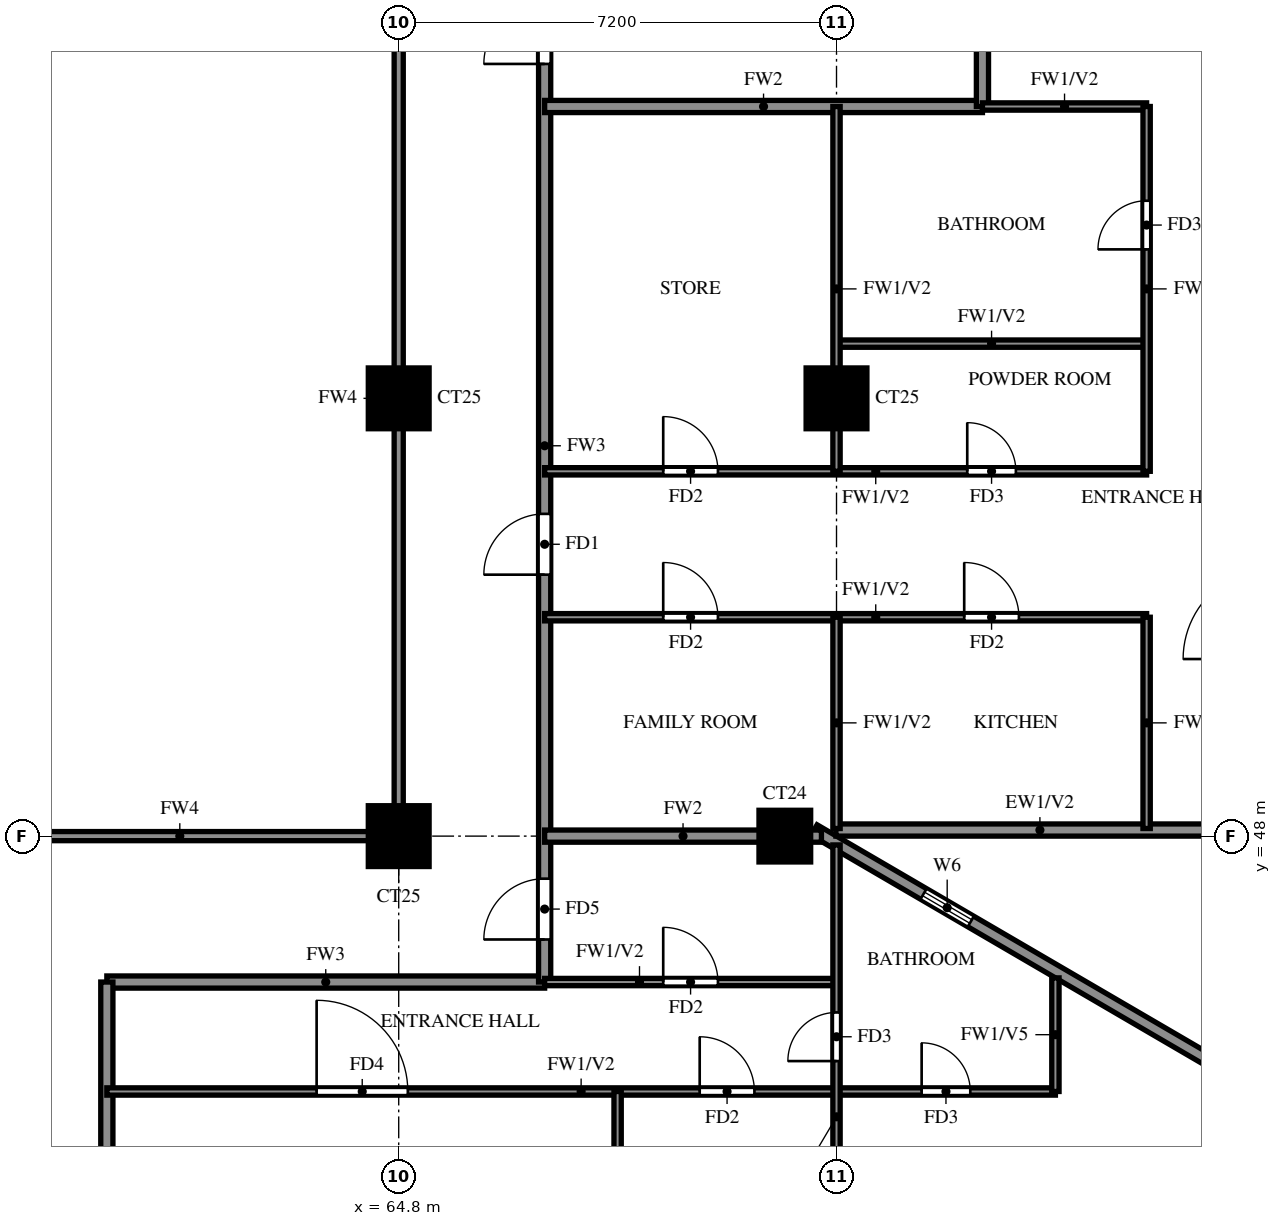
"""IFC4 building model, lengths in metres.
Left out: names, types, materials, properties, quantities, classifications, styles, units other than length and angle.
Written with IfcOpenShell. Run it as: python <this file> out.ifc"""

import sys

from ifc_helpers import new_model, si_unit, direction, frame, frame_2d, origin, origin_2d, place, context, subcontext, project, spatial, rectangle, extrude, source, transform, mapped, element, fill, save


model = new_model("IFC4")
c1 = context("Model", 3, precision=1e-05, world=origin(), true_north=direction((0.0, 1.0)))
c2 = subcontext(c1, "Body", "Model", "MODEL_VIEW")
j1 = project(units=[si_unit("LENGTHUNIT", "METRE"), si_unit("PLANEANGLEUNIT", "RADIAN")], contexts=[c1])
p1 = place(None, origin())
s1 = spatial("IfcSite", under=j1, at=p1, CompositionType="ELEMENT")
p2 = place(p1, origin())
s2 = spatial("IfcBuilding", under=s1, at=p2, CompositionType="ELEMENT")
p3 = place(p2, frame((0.0, 0.0, 164.0)))
s3 = spatial("IfcBuildingStorey", under=s2, at=p3, CompositionType="ELEMENT", Elevation=164.0)
m1 = source(origin(), c2, "Body", "SweptSolid", [
    extrude(rectangle(XDim=1.0, YDim=1.0, at=origin_2d()), origin(), (0.0, 0.0, 1.0), 3.2),
])
p4 = place(p3, frame((64.8, 48.0, 0.0), z_axis=(0.0, 0.0, 1.0), x_axis=(1.0, 0.0, 0.0)))
e1 = element("IfcColumn", 1, at=p4, inside=s3, PredefinedType="COLUMN", context=c2, shape_type="MappedRepresentation", body=[
    mapped(m1, transform((0.0, 0.0, 0.0))),
])
m2 = source(origin(), c2, "Body", "SweptSolid", [
    extrude(rectangle(XDim=0.85, YDim=0.85, at=origin_2d()), origin(), (0.0, 0.0, 1.0), 3.2),
])
p5 = place(p3, frame((71.15, 48.0, 0.0), z_axis=(0.0, 0.0, 1.0), x_axis=(1.0, 0.0, 0.0)))
e2 = element("IfcColumn", 2, at=p5, inside=s3, PredefinedType="COLUMN", context=c2, shape_type="MappedRepresentation", body=[
    mapped(m2, transform((0.0, 0.0, 0.0))),
])
for number, where, z_axis, x_axis in (
    (3, (64.8, 55.2, 0.0), (0.0, 0.0, 1.0), (1.0, 0.0, 0.0)),
    (4, (72.0, 55.2, 0.0), (0.0, 0.0, 1.0), (1.0, 0.0, 0.0)),
):
    element("IfcColumn", number, at=place(p3, frame(where, z_axis=z_axis, x_axis=x_axis)), inside=s3, PredefinedType="COLUMN", context=c2, shape_type="MappedRepresentation", body=[
        mapped(m1, transform((0.0, 0.0, 0.0))),
    ])
p6 = place(p3, frame((85.719, 39.881, 0.0), z_axis=(0.0, 0.0, 1.0), x_axis=(-0.86377618652, 0.503875678716, 0.0)))
e5 = element("IfcWall", 5, at=p6, inside=s3, PredefinedType="SOLIDWALL", context=c2, shape_type="SweptSolid", body=[
    extrude(rectangle(XDim=16.311, YDim=0.2, at=frame_2d((8.156, 0.0))), origin(), (0.0, 0.0, 1.0), 3.2),
])
p7 = place(p6, frame((13.326, 0.0, 1.5)))
e6 = element("IfcOpeningElement", 6, at=p7, cuts=e5, PredefinedType="OPENING", context=c2, shape_type="SweptSolid", body=[
    extrude(rectangle(XDim=0.9, YDim=0.9, at=frame_2d((0.45, 0.45))), frame((0.0, 0.11, 0.0), z_axis=(0.0, -1.0, 0.0), x_axis=(1.0, 0.0, 0.0)), (0.0, 0.0, 1.0), 0.22),
])
p8 = place(p3, frame((71.99, 48.1, 0.0), z_axis=(0.0, 0.0, 1.0), x_axis=(1.0, 0.0, 0.0)))
e7 = element("IfcWall", 7, at=p8, inside=s3, PredefinedType="SOLIDWALL", context=c2, shape_type="SweptSolid", body=[
    extrude(rectangle(XDim=6.71, YDim=0.2, at=frame_2d((3.355, 0.0))), origin(), (0.0, 0.0, 1.0), 3.2),
])
p9 = place(p3, frame((60.0, 45.6, 0.0), z_axis=(0.0, 0.0, 1.0), x_axis=(1.0, 0.0, 0.0)))
e8 = element("IfcWall", 8, at=p9, inside=s3, PredefinedType="SOLIDWALL", context=c2, shape_type="SweptSolid", body=[
    extrude(rectangle(XDim=7.2, YDim=0.2, at=frame_2d((3.6, 0.0))), origin(), (0.0, 0.0, 1.0), 3.2),
])
p10 = place(p3, frame((60.0, 39.725, 0.0), z_axis=(0.0, 0.0, 1.0), x_axis=(0.0, 1.0, 0.0)))
e9 = element("IfcWall", 9, at=p10, inside=s3, PredefinedType="SOLIDWALL", context=c2, shape_type="SweptSolid", body=[
    extrude(rectangle(XDim=5.875, YDim=0.2, at=frame_2d((2.938, 0.0))), origin(), (0.0, 0.0, 1.0), 3.2),
])
p11 = place(p3, frame((67.2, 45.6, 0.0), z_axis=(0.0, 0.0, 1.0), x_axis=(0.0, 1.0, 0.0)))
e10 = element("IfcWall", 10, at=p11, inside=s3, PredefinedType="SOLIDWALL", context=c2, shape_type="SweptSolid", body=[
    extrude(rectangle(XDim=16.8, YDim=0.2, at=frame_2d((8.4, 0.0))), origin(), (0.0, 0.0, 1.0), 3.2),
])
p12 = place(p11, frame((6.7, 0.0, 0.0)))
e11 = element("IfcOpeningElement", 11, at=p12, cuts=e10, PredefinedType="OPENING", context=c2, shape_type="SweptSolid", body=[
    extrude(rectangle(XDim=1.0, YDim=2.1, at=frame_2d((0.5, 1.05))), frame((0.0, 0.11, 0.0), z_axis=(0.0, -1.0, 0.0), x_axis=(1.0, 0.0, 0.0)), (0.0, 0.0, 1.0), 0.22),
])
p13 = place(p11, frame((15.1, 0.0, 0.0)))
e12 = element("IfcOpeningElement", 12, at=p13, cuts=e10, PredefinedType="OPENING", context=c2, shape_type="SweptSolid", body=[
    extrude(rectangle(XDim=1.0, YDim=2.1, at=frame_2d((0.5, 1.05))), frame((0.0, 0.11, 0.0), z_axis=(0.0, -1.0, 0.0), x_axis=(1.0, 0.0, 0.0)), (0.0, 0.0, 1.0), 0.22),
])
p14 = place(p11, frame((0.7, 0.0, 0.0)))
e13 = element("IfcOpeningElement", 13, at=p14, cuts=e10, PredefinedType="OPENING", context=c2, shape_type="SweptSolid", body=[
    extrude(rectangle(XDim=1.0, YDim=2.1, at=frame_2d((0.5, 1.05))), frame((0.0, 0.11, 0.0), z_axis=(0.0, -1.0, 0.0), x_axis=(1.0, 0.0, 0.0)), (0.0, 0.0, 1.0), 0.22),
])
p15 = place(p3, frame((67.2, 48.0, 0.0), z_axis=(0.0, 0.0, 1.0), x_axis=(1.0, 0.0, 0.0)))
e14 = element("IfcWall", 14, at=p15, inside=s3, PredefinedType="SOLIDWALL", context=c2, shape_type="SweptSolid", body=[
    extrude(rectangle(XDim=4.552, YDim=0.2, at=frame_2d((2.276, 0.0))), origin(), (0.0, 0.0, 1.0), 3.2),
])
p16 = place(p3, frame((67.2, 60.0, 0.0), z_axis=(0.0, 0.0, 1.0), x_axis=(1.0, 0.0, 0.0)))
e15 = element("IfcWall", 15, at=p16, inside=s3, PredefinedType="SOLIDWALL", context=c2, shape_type="SweptSolid", body=[
    extrude(rectangle(XDim=7.2, YDim=0.2, at=frame_2d((3.6, 0.0))), origin(), (0.0, 0.0, 1.0), 3.2),
])
p17 = place(p3, frame((74.4, 60.0, 0.0), z_axis=(0.0, 0.0, 1.0), x_axis=(0.0, 1.0, 0.0)))
e16 = element("IfcWall", 16, at=p17, inside=s3, PredefinedType="SOLIDWALL", context=c2, shape_type="SweptSolid", body=[
    extrude(rectangle(XDim=2.4, YDim=0.2, at=frame_2d((1.2, 0.0))), origin(), (0.0, 0.0, 1.0), 3.2),
])
p18 = place(p3, frame((60.0, 43.8, 0.0), z_axis=(0.0, 0.0, 1.0), x_axis=(1.0, 0.0, 0.0)))
e17 = element("IfcWall", 17, at=p18, inside=s3, PredefinedType="PARTITIONING", context=c2, shape_type="SweptSolid", body=[
    extrude(rectangle(XDim=15.6, YDim=0.12, at=frame_2d((7.8, 0.0))), origin(), (0.0, 0.0, 1.0), 3.2),
])
p19 = place(p18, frame((9.75, 0.0, 0.0)))
e18 = element("IfcOpeningElement", 18, at=p19, cuts=e17, PredefinedType="OPENING", context=c2, shape_type="SweptSolid", body=[
    extrude(rectangle(XDim=0.9, YDim=2.1, at=frame_2d((0.45, 1.05))), frame((0.0, 0.07, 0.0), z_axis=(0.0, -1.0, 0.0), x_axis=(1.0, 0.0, 0.0)), (0.0, 0.0, 1.0), 0.14),
])
p20 = place(p18, frame((3.45, 0.0, 0.0)))
e19 = element("IfcOpeningElement", 19, at=p20, cuts=e17, PredefinedType="OPENING", context=c2, shape_type="SweptSolid", body=[
    extrude(rectangle(XDim=1.5, YDim=2.1, at=frame_2d((0.75, 1.05))), frame((0.0, 0.07, 0.0), z_axis=(0.0, -1.0, 0.0), x_axis=(1.0, 0.0, 0.0)), (0.0, 0.0, 1.0), 0.14),
])
p21 = place(p18, frame((13.4, 0.0, 0.0)))
e20 = element("IfcOpeningElement", 20, at=p21, cuts=e17, PredefinedType="OPENING", context=c2, shape_type="SweptSolid", body=[
    extrude(rectangle(XDim=0.8, YDim=2.1, at=frame_2d((0.4, 1.05))), frame((0.0, 0.07, 0.0), z_axis=(0.0, -1.0, 0.0), x_axis=(1.0, 0.0, 0.0)), (0.0, 0.0, 1.0), 0.14),
])
p22 = place(p3, frame((67.2, 45.6, 0.0), z_axis=(0.0, 0.0, 1.0), x_axis=(1.0, 0.0, 0.0)))
e21 = element("IfcWall", 21, at=p22, inside=s3, PredefinedType="PARTITIONING", context=c2, shape_type="SweptSolid", body=[
    extrude(rectangle(XDim=4.8, YDim=0.12, at=frame_2d((2.4, 0.0))), origin(), (0.0, 0.0, 1.0), 3.2),
])
p23 = place(p22, frame((1.95, 0.0, 0.0)))
e22 = element("IfcOpeningElement", 22, at=p23, cuts=e21, PredefinedType="OPENING", context=c2, shape_type="SweptSolid", body=[
    extrude(rectangle(XDim=0.9, YDim=2.1, at=frame_2d((0.45, 1.05))), frame((0.0, 0.07, 0.0), z_axis=(0.0, -1.0, 0.0), x_axis=(1.0, 0.0, 0.0)), (0.0, 0.0, 1.0), 0.14),
])
p24 = place(p3, frame((67.2, 51.6, 0.0), z_axis=(0.0, 0.0, 1.0), x_axis=(1.0, 0.0, 0.0)))
e23 = element("IfcWall", 23, at=p24, inside=s3, PredefinedType="PARTITIONING", context=c2, shape_type="SweptSolid", body=[
    extrude(rectangle(XDim=9.9, YDim=0.12, at=frame_2d((4.95, 0.0))), origin(), (0.0, 0.0, 1.0), 3.2),
])
p25 = place(p24, frame((6.9, 0.0, 0.0)))
e24 = element("IfcOpeningElement", 24, at=p25, cuts=e23, PredefinedType="OPENING", context=c2, shape_type="SweptSolid", body=[
    extrude(rectangle(XDim=0.9, YDim=2.1, at=frame_2d((0.45, 1.05))), frame((0.0, 0.07, 0.0), z_axis=(0.0, -1.0, 0.0), x_axis=(1.0, 0.0, 0.0)), (0.0, 0.0, 1.0), 0.14),
])
p26 = place(p24, frame((1.95, 0.0, 0.0)))
e25 = element("IfcOpeningElement", 25, at=p26, cuts=e23, PredefinedType="OPENING", context=c2, shape_type="SweptSolid", body=[
    extrude(rectangle(XDim=0.9, YDim=2.1, at=frame_2d((0.45, 1.05))), frame((0.0, 0.07, 0.0), z_axis=(0.0, -1.0, 0.0), x_axis=(1.0, 0.0, 0.0)), (0.0, 0.0, 1.0), 0.14),
])
p27 = place(p3, frame((67.2, 54.0, 0.0), z_axis=(0.0, 0.0, 1.0), x_axis=(1.0, 0.0, 0.0)))
e26 = element("IfcWall", 26, at=p27, inside=s3, PredefinedType="PARTITIONING", context=c2, shape_type="SweptSolid", body=[
    extrude(rectangle(XDim=9.9, YDim=0.12, at=frame_2d((4.95, 0.0))), origin(), (0.0, 0.0, 1.0), 3.2),
])
p28 = place(p27, frame((6.95, 0.0, 0.0)))
e27 = element("IfcOpeningElement", 27, at=p28, cuts=e26, PredefinedType="OPENING", context=c2, shape_type="SweptSolid", body=[
    extrude(rectangle(XDim=0.8, YDim=2.1, at=frame_2d((0.4, 1.05))), frame((0.0, 0.07, 0.0), z_axis=(0.0, -1.0, 0.0), x_axis=(1.0, 0.0, 0.0)), (0.0, 0.0, 1.0), 0.14),
])
p29 = place(p27, frame((1.95, 0.0, 0.0)))
e28 = element("IfcOpeningElement", 28, at=p29, cuts=e26, PredefinedType="OPENING", context=c2, shape_type="SweptSolid", body=[
    extrude(rectangle(XDim=0.9, YDim=2.1, at=frame_2d((0.45, 1.05))), frame((0.0, 0.07, 0.0), z_axis=(0.0, -1.0, 0.0), x_axis=(1.0, 0.0, 0.0)), (0.0, 0.0, 1.0), 0.14),
])
p30 = place(p3, frame((72.0, 56.1, 0.0), z_axis=(0.0, 0.0, 1.0), x_axis=(1.0, 0.0, 0.0)))
e29 = element("IfcWall", 29, at=p30, inside=s3, PredefinedType="PARTITIONING", context=c2, shape_type="SweptSolid", body=[
    extrude(rectangle(XDim=5.1, YDim=0.12, at=frame_2d((2.55, 0.0))), origin(), (0.0, 0.0, 1.0), 3.2),
])
p31 = place(p3, frame((74.4, 60.0, 0.0), z_axis=(0.0, 0.0, 1.0), x_axis=(1.0, 0.0, 0.0)))
e30 = element("IfcWall", 30, at=p31, inside=s3, PredefinedType="PARTITIONING", context=c2, shape_type="SweptSolid", body=[
    extrude(rectangle(XDim=2.7, YDim=0.12, at=frame_2d((1.35, 0.0))), origin(), (0.0, 0.0, 1.0), 3.2),
])
p32 = place(p3, frame((68.4, 39.725, 0.0), z_axis=(0.0, 0.0, 1.0), x_axis=(0.0, 1.0, 0.0)))
e31 = element("IfcWall", 31, at=p32, inside=s3, PredefinedType="PARTITIONING", context=c2, shape_type="SweptSolid", body=[
    extrude(rectangle(XDim=4.075, YDim=0.12, at=frame_2d((2.038, 0.0))), origin(), (0.0, 0.0, 1.0), 3.2),
])
p33 = place(p32, frame((1.288, 0.0, 0.0)))
e32 = element("IfcOpeningElement", 32, at=p33, cuts=e31, PredefinedType="OPENING", context=c2, shape_type="SweptSolid", body=[
    extrude(rectangle(XDim=1.5, YDim=2.1, at=frame_2d((0.75, 1.05))), frame((0.0, 0.07, 0.0), z_axis=(0.0, -1.0, 0.0), x_axis=(1.0, 0.0, 0.0)), (0.0, 0.0, 1.0), 0.14),
])
p34 = place(p3, frame((72.0, 39.725, 0.0), z_axis=(0.0, 0.0, 1.0), x_axis=(0.0, 1.0, 0.0)))
e33 = element("IfcWall", 33, at=p34, inside=s3, PredefinedType="PARTITIONING", context=c2, shape_type="SweptSolid", body=[
    extrude(rectangle(XDim=8.13, YDim=0.12, at=frame_2d((4.065, 0.0))), origin(), (0.0, 0.0, 1.0), 2.3),
])
p35 = place(p34, frame((1.788, 0.0, 0.0)))
e34 = element("IfcOpeningElement", 34, at=p35, cuts=e33, PredefinedType="OPENING", context=c2, shape_type="SweptSolid", body=[
    extrude(rectangle(XDim=0.9, YDim=2.1, at=frame_2d((0.45, 1.05))), frame((0.0, 0.07, 0.0), z_axis=(0.0, -1.0, 0.0), x_axis=(1.0, 0.0, 0.0)), (0.0, 0.0, 1.0), 0.14),
])
p36 = place(p34, frame((4.575, 0.0, 0.0)))
e35 = element("IfcOpeningElement", 35, at=p36, cuts=e33, PredefinedType="OPENING", context=c2, shape_type="SweptSolid", body=[
    extrude(rectangle(XDim=0.8, YDim=2.1, at=frame_2d((0.4, 1.05))), frame((0.0, 0.07, 0.0), z_axis=(0.0, -1.0, 0.0), x_axis=(1.0, 0.0, 0.0)), (0.0, 0.0, 1.0), 0.14),
])
p37 = place(p3, frame((72.0, 48.125, 0.0), z_axis=(0.0, 0.0, 1.0), x_axis=(0.0, 1.0, 0.0)))
e36 = element("IfcWall", 36, at=p37, inside=s3, PredefinedType="PARTITIONING", context=c2, shape_type="SweptSolid", body=[
    extrude(rectangle(XDim=3.475, YDim=0.12, at=frame_2d((1.738, 0.0))), origin(), (0.0, 0.0, 1.0), 3.2),
])
p38 = place(p3, frame((72.0, 54.0, 0.0), z_axis=(0.0, 0.0, 1.0), x_axis=(0.0, 1.0, 0.0)))
e37 = element("IfcWall", 37, at=p38, inside=s3, PredefinedType="PARTITIONING", context=c2, shape_type="SweptSolid", body=[
    extrude(rectangle(XDim=6.0, YDim=0.12, at=frame_2d((3.0, 0.0))), origin(), (0.0, 0.0, 1.0), 3.2),
])
p39 = place(p3, frame((75.6, 43.8, 0.0), z_axis=(0.0, 0.0, 1.0), x_axis=(0.0, 1.0, 0.0)))
e38 = element("IfcWall", 38, at=p39, inside=s3, PredefinedType="PARTITIONING", context=c2, shape_type="SweptSolid", body=[
    extrude(rectangle(XDim=1.868, YDim=0.12, at=frame_2d((0.934, 0.0))), origin(), (0.0, 0.0, 1.0), 2.3),
])
p40 = place(p3, frame((77.1, 48.125, 0.0), z_axis=(0.0, 0.0, 1.0), x_axis=(0.0, 1.0, 0.0)))
e39 = element("IfcWall", 39, at=p40, inside=s3, PredefinedType="PARTITIONING", context=c2, shape_type="SweptSolid", body=[
    extrude(rectangle(XDim=3.475, YDim=0.12, at=frame_2d((1.738, 0.0))), origin(), (0.0, 0.0, 1.0), 3.2),
])
p41 = place(p3, frame((77.1, 54.0, 0.0), z_axis=(0.0, 0.0, 1.0), x_axis=(0.0, 1.0, 0.0)))
e40 = element("IfcWall", 40, at=p41, inside=s3, PredefinedType="PARTITIONING", context=c2, shape_type="SweptSolid", body=[
    extrude(rectangle(XDim=6.0, YDim=0.12, at=frame_2d((3.0, 0.0))), origin(), (0.0, 0.0, 1.0), 3.2),
])
p42 = place(p41, frame((3.65, 0.0, 0.0)))
e41 = element("IfcOpeningElement", 41, at=p42, cuts=e40, PredefinedType="OPENING", context=c2, shape_type="SweptSolid", body=[
    extrude(rectangle(XDim=0.8, YDim=2.1, at=frame_2d((0.4, 1.05))), frame((0.0, 0.07, 0.0), z_axis=(0.0, -1.0, 0.0), x_axis=(1.0, 0.0, 0.0)), (0.0, 0.0, 1.0), 0.14),
])
p43 = place(p3, frame((57.6, 48.0, 0.0), z_axis=(0.0, 0.0, 1.0), x_axis=(1.0, 0.0, 0.0)))
e42 = element("IfcWall", 42, at=p43, inside=s3, PredefinedType="SOLIDWALL", context=c2, shape_type="SweptSolid", body=[
    extrude(rectangle(XDim=7.2, YDim=0.15, at=frame_2d((3.6, 0.0))), origin(), (0.0, 0.0, 1.0), 2.3),
])
p44 = place(p3, frame((64.8, 48.0, 0.0), z_axis=(0.0, 0.0, 1.0), x_axis=(0.0, 1.0, 0.0)))
e43 = element("IfcWall", 43, at=p44, inside=s3, PredefinedType="SOLIDWALL", context=c2, shape_type="SweptSolid", body=[
    extrude(rectangle(XDim=14.4, YDim=0.15, at=frame_2d((7.2, 0.0))), origin(), (0.0, 0.0, 1.0), 2.3),
])
p45 = place(p7, origin())
e44 = element("IfcWindow", 44, at=p45, inside=s3, PartitioningType="SINGLE_PANEL", PredefinedType="WINDOW", context=c2, shape_type="SweptSolid", body=[
    extrude(rectangle(XDim=0.9, YDim=0.9, at=frame_2d((0.45, 0.45))), frame((0.0, 0.03, 0.0), z_axis=(0.0, -1.0, 0.0), x_axis=(1.0, 0.0, 0.0)), (0.0, 0.0, 1.0), 0.06),
])
fill(e6, e44)
p46 = place(p12, origin())
e45 = element("IfcDoor", 45, at=p46, inside=s3, OperationType="SINGLE_SWING_LEFT", PredefinedType="DOOR", context=c2, shape_type="SweptSolid", body=[
    extrude(rectangle(XDim=1.0, YDim=2.1, at=frame_2d((0.5, 1.05))), frame((0.0, 0.025, 0.0), z_axis=(0.0, -1.0, 0.0), x_axis=(1.0, 0.0, 0.0)), (0.0, 0.0, 1.0), 0.05),
])
fill(e11, e45)
p47 = place(p25, origin())
e46 = element("IfcDoor", 46, at=p47, inside=s3, OperationType="SINGLE_SWING_LEFT", PredefinedType="DOOR", context=c2, shape_type="SweptSolid", body=[
    extrude(rectangle(XDim=0.9, YDim=2.1, at=frame_2d((0.45, 1.05))), frame((0.0, 0.025, 0.0), z_axis=(0.0, -1.0, 0.0), x_axis=(1.0, 0.0, 0.0)), (0.0, 0.0, 1.0), 0.05),
])
fill(e24, e46)
p48 = place(p28, origin())
e47 = element("IfcDoor", 47, at=p48, inside=s3, OperationType="SINGLE_SWING_RIGHT", PredefinedType="DOOR", context=c2, shape_type="SweptSolid", body=[
    extrude(rectangle(XDim=0.8, YDim=2.1, at=frame_2d((0.4, 1.05))), frame((0.0, 0.025, 0.0), z_axis=(0.0, -1.0, 0.0), x_axis=(1.0, 0.0, 0.0)), (0.0, 0.0, 1.0), 0.05),
])
fill(e27, e47)
p49 = place(p42, origin())
e48 = element("IfcDoor", 48, at=p49, inside=s3, OperationType="SINGLE_SWING_LEFT", PredefinedType="DOOR", context=c2, shape_type="SweptSolid", body=[
    extrude(rectangle(XDim=0.8, YDim=2.1, at=frame_2d((0.4, 1.05))), frame((0.0, 0.025, 0.0), z_axis=(0.0, -1.0, 0.0), x_axis=(1.0, 0.0, 0.0)), (0.0, 0.0, 1.0), 0.05),
])
fill(e41, e48)
p50 = place(p26, origin())
e49 = element("IfcDoor", 49, at=p50, inside=s3, OperationType="SINGLE_SWING_LEFT", PredefinedType="DOOR", context=c2, shape_type="SweptSolid", body=[
    extrude(rectangle(XDim=0.9, YDim=2.1, at=frame_2d((0.45, 1.05))), frame((0.0, 0.025, 0.0), z_axis=(0.0, -1.0, 0.0), x_axis=(1.0, 0.0, 0.0)), (0.0, 0.0, 1.0), 0.05),
])
fill(e25, e49)
p51 = place(p29, origin())
e50 = element("IfcDoor", 50, at=p51, inside=s3, OperationType="SINGLE_SWING_RIGHT", PredefinedType="DOOR", context=c2, shape_type="SweptSolid", body=[
    extrude(rectangle(XDim=0.9, YDim=2.1, at=frame_2d((0.45, 1.05))), frame((0.0, 0.025, 0.0), z_axis=(0.0, -1.0, 0.0), x_axis=(1.0, 0.0, 0.0)), (0.0, 0.0, 1.0), 0.05),
])
fill(e28, e50)
p52 = place(p13, origin())
e51 = element("IfcDoor", 51, at=p52, inside=s3, OperationType="SINGLE_SWING_LEFT", PredefinedType="DOOR", context=c2, shape_type="SweptSolid", body=[
    extrude(rectangle(XDim=1.0, YDim=2.1, at=frame_2d((0.5, 1.05))), frame((0.0, 0.025, 0.0), z_axis=(0.0, -1.0, 0.0), x_axis=(1.0, 0.0, 0.0)), (0.0, 0.0, 1.0), 0.05),
])
fill(e12, e51)
p53 = place(p23, origin())
e52 = element("IfcDoor", 52, at=p53, inside=s3, OperationType="SINGLE_SWING_RIGHT", PredefinedType="DOOR", context=c2, shape_type="SweptSolid", body=[
    extrude(rectangle(XDim=0.9, YDim=2.1, at=frame_2d((0.45, 1.05))), frame((0.0, 0.025, 0.0), z_axis=(0.0, -1.0, 0.0), x_axis=(1.0, 0.0, 0.0)), (0.0, 0.0, 1.0), 0.05),
])
fill(e22, e52)
p54 = place(p14, origin())
e53 = element("IfcDoor", 53, at=p54, inside=s3, OperationType="SINGLE_SWING_LEFT", PredefinedType="DOOR", context=c2, shape_type="SweptSolid", body=[
    extrude(rectangle(XDim=1.0, YDim=2.1, at=frame_2d((0.5, 1.05))), frame((0.0, 0.025, 0.0), z_axis=(0.0, -1.0, 0.0), x_axis=(1.0, 0.0, 0.0)), (0.0, 0.0, 1.0), 0.05),
])
fill(e13, e53)
p55 = place(p19, origin())
e54 = element("IfcDoor", 54, at=p55, inside=s3, OperationType="SINGLE_SWING_LEFT", PredefinedType="DOOR", context=c2, shape_type="SweptSolid", body=[
    extrude(rectangle(XDim=0.9, YDim=2.1, at=frame_2d((0.45, 1.05))), frame((0.0, 0.025, 0.0), z_axis=(0.0, -1.0, 0.0), x_axis=(1.0, 0.0, 0.0)), (0.0, 0.0, 1.0), 0.05),
])
fill(e18, e54)
p56 = place(p20, origin())
e55 = element("IfcDoor", 55, at=p56, inside=s3, OperationType="SINGLE_SWING_RIGHT", PredefinedType="DOOR", context=c2, shape_type="SweptSolid", body=[
    extrude(rectangle(XDim=1.5, YDim=2.1, at=frame_2d((0.75, 1.05))), frame((0.0, 0.025, 0.0), z_axis=(0.0, -1.0, 0.0), x_axis=(1.0, 0.0, 0.0)), (0.0, 0.0, 1.0), 0.05),
])
fill(e19, e55)
p57 = place(p36, origin())
e56 = element("IfcDoor", 56, at=p57, inside=s3, OperationType="SINGLE_SWING_LEFT", PredefinedType="DOOR", context=c2, shape_type="SweptSolid", body=[
    extrude(rectangle(XDim=0.8, YDim=2.1, at=frame_2d((0.4, 1.05))), frame((0.0, 0.025, 0.0), z_axis=(0.0, -1.0, 0.0), x_axis=(1.0, 0.0, 0.0)), (0.0, 0.0, 1.0), 0.05),
])
fill(e35, e56)
p58 = place(p21, origin())
e57 = element("IfcDoor", 57, at=p58, inside=s3, OperationType="SINGLE_SWING_RIGHT", PredefinedType="DOOR", context=c2, shape_type="SweptSolid", body=[
    extrude(rectangle(XDim=0.8, YDim=2.1, at=frame_2d((0.4, 1.05))), frame((0.0, 0.025, 0.0), z_axis=(0.0, -1.0, 0.0), x_axis=(1.0, 0.0, 0.0)), (0.0, 0.0, 1.0), 0.05),
])
fill(e20, e57)
save(model, sys.argv[1])
